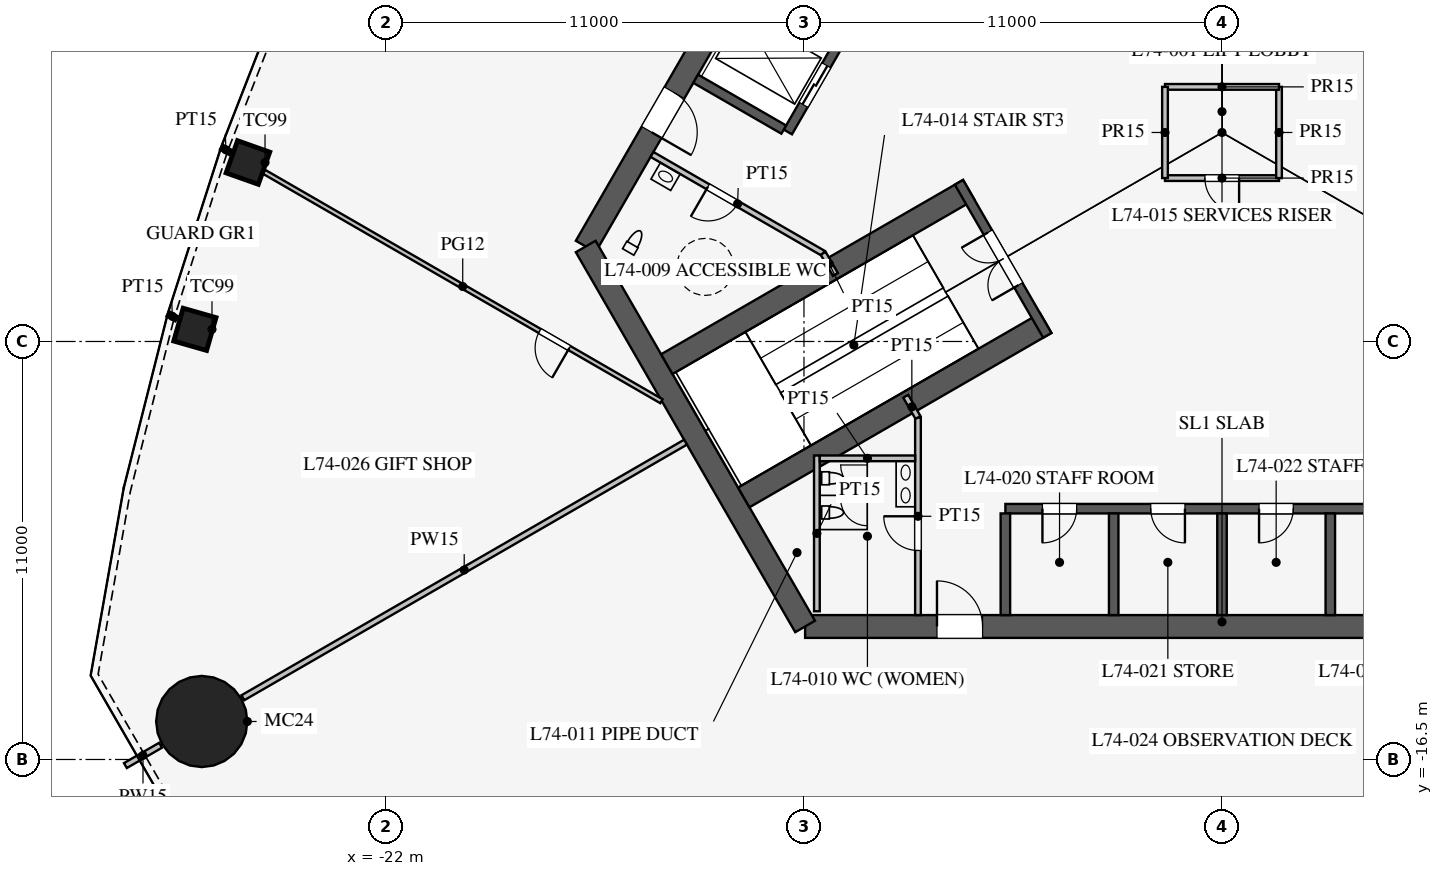
"""IFC4 building model, lengths in metres.
Left out: names, types, materials, properties, quantities, classifications, styles, units other than length and angle.
Written with IfcOpenShell. Run it as: python <this file> out.ifc"""

import sys

from ifc_helpers import new_model, si_unit, direction, frame, frame_2d, origin, origin_2d, place, context, subcontext, project, spatial, rectangle, circle, extrude, element, fill, save


model = new_model("IFC4")
c1 = context("Model", 3, precision=1e-05, world=origin(), true_north=direction((0.0, 1.0)))
c2 = subcontext(c1, "Body", "Model", "MODEL_VIEW")
j1 = project(units=[si_unit("LENGTHUNIT", "METRE"), si_unit("PLANEANGLEUNIT", "RADIAN")], contexts=[c1])
p1 = place(None, origin())
s1 = spatial("IfcSite", under=j1, at=p1, CompositionType="ELEMENT")
p2 = place(p1, origin())
s2 = spatial("IfcBuilding", under=s1, at=p2, CompositionType="ELEMENT")
p3 = place(p2, frame((0.0, 0.0, 322.5)))
s3 = spatial("IfcBuildingStorey", under=s2, at=p3, CompositionType="ELEMENT", Elevation=322.5)
for number, where, z_axis, x_axis in (
    (1, (-25.632, -0.79, 0.0), (0.0, 0.0, 1.0), (-0.334, -0.942, 0.0)),
    (2, (-27.027, -5.18, 0.0), (0.0, 0.0, 1.0), (-0.275, -0.961, 0.0)),
):
    element("IfcColumn", number, at=place(p3, frame(where, z_axis=z_axis, x_axis=x_axis)), inside=s3, PredefinedType="COLUMN", context=c2, shape_type="SweptSolid", body=[
        extrude(rectangle(XDim=0.9, YDim=0.9, at=origin_2d()), origin(), (0.0, 0.0, 1.0), 6.0),
    ])
p4 = place(p3, frame((-26.847, -15.5, 0.0), z_axis=(0.0, 0.0, 1.0), x_axis=(1.0, 0.0, 0.0)))
e3 = element("IfcColumn", 3, at=p4, inside=s3, PredefinedType="COLUMN", context=c2, shape_type="SweptSolid", body=[
    extrude(circle(Radius=1.2, at=origin_2d()), origin(), (0.0, 0.0, 1.0), 6.0),
])
p5 = place(p3, frame((-10.97, -13.0, 0.0), z_axis=(0.0, 0.0, 1.0), x_axis=(1.0, 0.0, 0.0)))
e4 = element("IfcWall", 4, at=p5, inside=s3, PredefinedType="SHEAR", context=c2, shape_type="SweptSolid", body=[
    extrude(rectangle(XDim=21.939, YDim=0.6, at=frame_2d((10.97, 0.0))), origin(), (0.0, 0.0, 1.0), 6.0),
])
p6 = place(p5, frame((17.27, 0.0, 0.0)))
e5 = element("IfcOpeningElement", 5, at=p6, cuts=e4, PredefinedType="OPENING", context=c2, shape_type="SweptSolid", body=[
    extrude(rectangle(XDim=1.2, YDim=2.1, at=frame_2d((0.6, 1.05))), frame((0.0, 0.31, 0.0), z_axis=(0.0, -1.0, 0.0), x_axis=(1.0, 0.0, 0.0)), (0.0, 0.0, 1.0), 0.62),
])
p7 = place(p5, frame((3.47, 0.0, 0.0)))
e6 = element("IfcOpeningElement", 6, at=p7, cuts=e4, PredefinedType="OPENING", context=c2, shape_type="SweptSolid", body=[
    extrude(rectangle(XDim=1.2, YDim=2.1, at=frame_2d((0.6, 1.05))), frame((0.0, 0.31, 0.0), z_axis=(0.0, -1.0, 0.0), x_axis=(1.0, 0.0, 0.0)), (0.0, 0.0, 1.0), 0.62),
])
p8 = place(p3, frame((-5.773, 16.0, 0.0), z_axis=(0.0, 0.0, 1.0), x_axis=(-0.500002442456, -0.866023993627, 0.0)))
e7 = element("IfcWall", 7, at=p8, inside=s3, PredefinedType="SHEAR", context=c2, shape_type="SweptSolid", body=[
    extrude(rectangle(XDim=21.939, YDim=0.6, at=frame_2d((10.97, 0.0))), origin(), (0.0, 0.0, 1.0), 6.0),
])
p9 = place(p8, frame((17.27, 0.0, 0.0)))
e8 = element("IfcOpeningElement", 8, at=p9, cuts=e7, PredefinedType="OPENING", context=c2, shape_type="SweptSolid", body=[
    extrude(rectangle(XDim=1.2, YDim=2.1, at=frame_2d((0.6, 1.05))), frame((0.0, 0.31, 0.0), z_axis=(0.0, -1.0, 0.0), x_axis=(1.0, 0.0, 0.0)), (0.0, 0.0, 1.0), 0.62),
])
p10 = place(p8, frame((3.47, 0.0, 0.0)))
e9 = element("IfcOpeningElement", 9, at=p10, cuts=e7, PredefinedType="OPENING", context=c2, shape_type="SweptSolid", body=[
    extrude(rectangle(XDim=1.2, YDim=2.1, at=frame_2d((0.6, 1.05))), frame((0.0, 0.31, 0.0), z_axis=(0.0, -1.0, 0.0), x_axis=(1.0, 0.0, 0.0)), (0.0, 0.0, 1.0), 0.62),
])
p11 = place(p3, frame((-16.743, -3.0, 0.0), z_axis=(0.0, 0.0, 1.0), x_axis=(0.499995765644, -0.866027848477, 0.0)))
e10 = element("IfcWall", 10, at=p11, inside=s3, PredefinedType="SHEAR", context=c2, shape_type="SweptSolid", body=[
    extrude(rectangle(XDim=11.547, YDim=0.6, at=frame_2d((5.773, 0.0))), origin(), (0.0, 0.0, 1.0), 6.0),
])
p12 = place(p3, frame((-5.7, -9.9, 0.0), z_axis=(0.0, 0.0, 1.0), x_axis=(1.0, 0.0, 0.0)))
e11 = element("IfcWall", 11, at=p12, inside=s3, PredefinedType="SHEAR", context=c2, shape_type="SweptSolid", body=[
    extrude(rectangle(XDim=11.4, YDim=0.25, at=frame_2d((5.7, 0.0))), origin(), (0.0, 0.0, 1.0), 6.0),
])
p13 = place(p12, frame((0.975, 0.0, 0.0)))
e12 = element("IfcOpeningElement", 12, at=p13, cuts=e11, PredefinedType="OPENING", context=c2, shape_type="SweptSolid", body=[
    extrude(rectangle(XDim=0.9, YDim=2.1, at=frame_2d((0.45, 1.05))), frame((0.0, 0.135, 0.0), z_axis=(0.0, -1.0, 0.0), x_axis=(1.0, 0.0, 0.0)), (0.0, 0.0, 1.0), 0.27),
])
p14 = place(p12, frame((3.825, 0.0, 0.0)))
e13 = element("IfcOpeningElement", 13, at=p14, cuts=e11, PredefinedType="OPENING", context=c2, shape_type="SweptSolid", body=[
    extrude(rectangle(XDim=0.9, YDim=2.1, at=frame_2d((0.45, 1.05))), frame((0.0, 0.135, 0.0), z_axis=(0.0, -1.0, 0.0), x_axis=(1.0, 0.0, 0.0)), (0.0, 0.0, 1.0), 0.27),
])
p15 = place(p12, frame((6.675, 0.0, 0.0)))
e14 = element("IfcOpeningElement", 14, at=p15, cuts=e11, PredefinedType="OPENING", context=c2, shape_type="SweptSolid", body=[
    extrude(rectangle(XDim=0.9, YDim=2.1, at=frame_2d((0.45, 1.05))), frame((0.0, 0.135, 0.0), z_axis=(0.0, -1.0, 0.0), x_axis=(1.0, 0.0, 0.0)), (0.0, 0.0, 1.0), 0.27),
])
p16 = place(p12, frame((9.525, 0.0, 0.0)))
e15 = element("IfcOpeningElement", 15, at=p16, cuts=e11, PredefinedType="OPENING", context=c2, shape_type="SweptSolid", body=[
    extrude(rectangle(XDim=0.9, YDim=2.1, at=frame_2d((0.45, 1.05))), frame((0.0, 0.135, 0.0), z_axis=(0.0, -1.0, 0.0), x_axis=(1.0, 0.0, 0.0)), (0.0, 0.0, 1.0), 0.27),
])
for number, where, z_axis, x_axis in (
    (16, (-5.7, -10.025, 0.0), (0.0, 0.0, 1.0), (0.0, -1.0, 0.0)),
    (17, (-2.85, -10.025, 0.0), (0.0, 0.0, 1.0), (0.0, -1.0, 0.0)),
    (18, (0.0, -10.025, 0.0), (0.0, 0.0, 1.0), (0.0, -1.0, 0.0)),
    (19, (2.85, -10.025, 0.0), (0.0, 0.0, 1.0), (0.0, -1.0, 0.0)),
):
    element("IfcWall", number, at=place(p3, frame(where, z_axis=z_axis, x_axis=x_axis)), inside=s3, PredefinedType="SHEAR", context=c2, shape_type="SweptSolid", body=[
        extrude(rectangle(XDim=2.675, YDim=0.25, at=frame_2d((1.337, 0.0))), origin(), (0.0, 0.0, 1.0), 6.0),
    ])
p17 = place(p3, frame((-5.724, 9.886, 0.0), z_axis=(0.0, 0.0, 1.0), x_axis=(-0.500001763848, -0.866024385424, 0.0)))
e20 = element("IfcWall", 20, at=p17, inside=s3, PredefinedType="SHEAR", context=c2, shape_type="SweptSolid", body=[
    extrude(rectangle(XDim=11.4, YDim=0.25, at=frame_2d((5.7, 0.0))), origin(), (0.0, 0.0, 1.0), 6.0),
])
p18 = place(p17, frame((0.875, 0.0, 0.0)))
e21 = element("IfcOpeningElement", 21, at=p18, cuts=e20, PredefinedType="OPENING", context=c2, shape_type="SweptSolid", body=[
    extrude(rectangle(XDim=1.1, YDim=2.2, at=frame_2d((0.55, 1.1))), frame((0.0, 0.135, 0.0), z_axis=(0.0, -1.0, 0.0), x_axis=(1.0, 0.0, 0.0)), (0.0, 0.0, 1.0), 0.27),
])
p19 = place(p17, frame((3.725, 0.0, 0.0)))
e22 = element("IfcOpeningElement", 22, at=p19, cuts=e20, PredefinedType="OPENING", context=c2, shape_type="SweptSolid", body=[
    extrude(rectangle(XDim=1.1, YDim=2.2, at=frame_2d((0.55, 1.1))), frame((0.0, 0.135, 0.0), z_axis=(0.0, -1.0, 0.0), x_axis=(1.0, 0.0, 0.0)), (0.0, 0.0, 1.0), 0.27),
])
p20 = place(p17, frame((6.525, 0.0, 0.0)))
e23 = element("IfcOpeningElement", 23, at=p20, cuts=e20, PredefinedType="OPENING", context=c2, shape_type="SweptSolid", body=[
    extrude(rectangle(XDim=1.2, YDim=2.2, at=frame_2d((0.6, 1.1))), frame((0.0, 0.135, 0.0), z_axis=(0.0, -1.0, 0.0), x_axis=(1.0, 0.0, 0.0)), (0.0, 0.0, 1.0), 0.27),
])
p21 = place(p17, frame((9.375, 0.0, 0.0)))
e24 = element("IfcOpeningElement", 24, at=p21, cuts=e20, PredefinedType="OPENING", context=c2, shape_type="SweptSolid", body=[
    extrude(rectangle(XDim=1.2, YDim=2.2, at=frame_2d((0.6, 1.1))), frame((0.0, 0.135, 0.0), z_axis=(0.0, -1.0, 0.0), x_axis=(1.0, 0.0, 0.0)), (0.0, 0.0, 1.0), 0.27),
])
p22 = place(p3, frame((-11.532, 0.076, 0.0), z_axis=(0.0, 0.0, 1.0), x_axis=(-0.86604424267, 0.499967368674, 0.0)))
e25 = element("IfcWall", 25, at=p22, inside=s3, PredefinedType="SHEAR", context=c2, shape_type="SweptSolid", body=[
    extrude(rectangle(XDim=2.675, YDim=0.25, at=frame_2d((1.337, 0.0))), origin(), (0.0, 0.0, 1.0), 6.0),
])
p23 = place(p3, frame((-6.663, -1.509, 0.0), z_axis=(0.0, 0.0, 1.0), x_axis=(-0.86603049496, -0.499991181721, 0.0)))
e26 = element("IfcWall", 26, at=p23, inside=s3, PredefinedType="SHEAR", context=c2, shape_type="SweptSolid", body=[
    extrude(rectangle(XDim=9.175, YDim=0.6, at=frame_2d((4.587, 0.0))), origin(), (0.0, 0.0, 1.0), 6.0),
])
p24 = place(p3, frame((-4.638, -5.016, 0.0), z_axis=(0.0, 0.0, 1.0), x_axis=(-0.866012320003, -0.50002266109, 0.0)))
e27 = element("IfcWall", 27, at=p24, inside=s3, PredefinedType="SHEAR", context=c2, shape_type="SweptSolid", body=[
    extrude(rectangle(XDim=9.175, YDim=0.6, at=frame_2d((4.587, 0.0))), origin(), (0.0, 0.0, 1.0), 6.0),
])
p25 = place(p3, frame((-6.922, -1.312, 0.0), z_axis=(0.0, 0.0, 1.0), x_axis=(0.499984536904, -0.866034331223, 0.0)))
e28 = element("IfcWall", 28, at=p25, inside=s3, PredefinedType="SHEAR", context=c2, shape_type="SweptSolid", body=[
    extrude(rectangle(XDim=4.65, YDim=0.25, at=frame_2d((2.325, 0.0))), origin(), (0.0, 0.0, 1.0), 6.0),
])
p26 = place(p25, frame((1.525, 0.0, 0.0)))
e29 = element("IfcOpeningElement", 29, at=p26, cuts=e28, PredefinedType="OPENING", context=c2, shape_type="SweptSolid", body=[
    extrude(rectangle(XDim=1.6, YDim=2.1, at=frame_2d((0.8, 1.05))), frame((0.0, 0.135, 0.0), z_axis=(0.0, -1.0, 0.0), x_axis=(1.0, 0.0, 0.0)), (0.0, 0.0, 1.0), 0.27),
])
p27 = place(p3, frame((-8.0, -7.5, 0.0), z_axis=(0.0, 0.0, 1.0), x_axis=(0.0, -1.0, 0.0)))
e30 = element("IfcWall", 30, at=p27, inside=s3, PredefinedType="PARTITIONING", context=c2, shape_type="SweptSolid", body=[
    extrude(rectangle(XDim=5.2, YDim=0.15, at=frame_2d((2.6, 0.0))), origin(), (0.0, 0.0, 1.0), 5.75),
])
p28 = place(p27, frame((2.6, 0.0, 0.0)))
e31 = element("IfcOpeningElement", 31, at=p28, cuts=e30, PredefinedType="OPENING", context=c2, shape_type="SweptSolid", body=[
    extrude(rectangle(XDim=0.9, YDim=2.1, at=frame_2d((0.45, 1.05))), frame((0.0, 0.085, 0.0), z_axis=(0.0, -1.0, 0.0), x_axis=(1.0, 0.0, 0.0)), (0.0, 0.0, 1.0), 0.17),
])
p29 = place(p3, frame((-10.495, -3.178, 0.0), z_axis=(0.0, 0.0, 1.0), x_axis=(-0.866021400173, 0.500006934395, 0.0)))
e32 = element("IfcWall", 32, at=p29, inside=s3, PredefinedType="PARTITIONING", context=c2, shape_type="SweptSolid", body=[
    extrude(rectangle(XDim=5.2, YDim=0.15, at=frame_2d((2.6, 0.0))), origin(), (0.0, 0.0, 1.0), 5.75),
])
p30 = place(p29, frame((2.6, 0.0, 0.0)))
e33 = element("IfcOpeningElement", 33, at=p30, cuts=e32, PredefinedType="OPENING", context=c2, shape_type="SweptSolid", body=[
    extrude(rectangle(XDim=0.9, YDim=2.1, at=frame_2d((0.45, 1.05))), frame((0.0, 0.085, 0.0), z_axis=(0.0, -1.0, 0.0), x_axis=(1.0, 0.0, 0.0)), (0.0, 0.0, 1.0), 0.17),
])
for number, where, z_axis, x_axis in (
    (34, (-10.495, -3.178, 0.0), (0.0, 0.0, 1.0), (0.5, -0.866, 0.0)),
    (35, (-8.0, -7.5, 0.0), (0.0, 0.0, 1.0), (-0.5, 0.866, 0.0)),
):
    element("IfcWall", number, at=place(p3, frame(where, z_axis=z_axis, x_axis=x_axis)), inside=s3, PredefinedType="PARTITIONING", context=c2, shape_type="SweptSolid", body=[
        extrude(rectangle(XDim=0.645, YDim=0.15, at=frame_2d((0.323, 0.0))), origin(), (0.0, 0.0, 1.0), 5.75),
    ])
p31 = place(p3, frame((-10.66, -8.5, 0.0), z_axis=(0.0, 0.0, 1.0), x_axis=(0.0, -1.0, 0.0)))
e36 = element("IfcWall", 36, at=p31, inside=s3, PredefinedType="PARTITIONING", context=c2, shape_type="SweptSolid", body=[
    extrude(rectangle(XDim=4.1, YDim=0.15, at=frame_2d((2.05, 0.0))), origin(), (0.0, 0.0, 1.0), 5.75),
])
p32 = place(p3, frame((-8.075, -8.575, 0.0), z_axis=(0.0, 0.0, 1.0), x_axis=(-1.0, 0.0, 0.0)))
e37 = element("IfcWall", 37, at=p32, inside=s3, PredefinedType="PARTITIONING", context=c2, shape_type="SweptSolid", body=[
    extrude(rectangle(XDim=2.51, YDim=0.15, at=frame_2d((1.255, 0.0))), origin(), (0.0, 0.0, 1.0), 5.75),
])
p33 = place(p3, frame((-1.5, -1.2, 0.0), z_axis=(0.0, 0.0, 1.0), x_axis=(1.0, 0.0, 0.0)))
e38 = element("IfcWall", 38, at=p33, inside=s3, PredefinedType="PARTITIONING", context=c2, shape_type="SweptSolid", body=[
    extrude(rectangle(XDim=3.0, YDim=0.15, at=frame_2d((1.5, 0.0))), origin(), (0.0, 0.0, 1.0), 5.75),
])
p34 = place(p33, frame((1.05, 0.0, 0.0)))
e39 = element("IfcOpeningElement", 39, at=p34, cuts=e38, PredefinedType="OPENING", context=c2, shape_type="SweptSolid", body=[
    extrude(rectangle(XDim=0.9, YDim=2.1, at=frame_2d((0.45, 1.05))), frame((0.0, 0.085, 0.0), z_axis=(0.0, -1.0, 0.0), x_axis=(1.0, 0.0, 0.0)), (0.0, 0.0, 1.0), 0.17),
])
p35 = place(p3, frame((1.5, -1.2, 0.0), z_axis=(0.0, 0.0, 1.0), x_axis=(0.0, 1.0, 0.0)))
e40 = element("IfcWall", 40, at=p35, inside=s3, PredefinedType="PARTITIONING", context=c2, shape_type="SweptSolid", body=[
    extrude(rectangle(XDim=2.4, YDim=0.15, at=frame_2d((1.2, 0.0))), origin(), (0.0, 0.0, 1.0), 5.75),
])
p36 = place(p3, frame((1.5, 1.2, 0.0), z_axis=(0.0, 0.0, 1.0), x_axis=(-1.0, 0.0, 0.0)))
e41 = element("IfcWall", 41, at=p36, inside=s3, PredefinedType="PARTITIONING", context=c2, shape_type="SweptSolid", body=[
    extrude(rectangle(XDim=3.0, YDim=0.15, at=frame_2d((1.5, 0.0))), origin(), (0.0, 0.0, 1.0), 5.75),
])
p37 = place(p3, frame((-1.5, 1.2, 0.0), z_axis=(0.0, 0.0, 1.0), x_axis=(0.0, -1.0, 0.0)))
e42 = element("IfcWall", 42, at=p37, inside=s3, PredefinedType="PARTITIONING", context=c2, shape_type="SweptSolid", body=[
    extrude(rectangle(XDim=2.4, YDim=0.15, at=frame_2d((1.2, 0.0))), origin(), (0.0, 0.0, 1.0), 5.75),
])
p38 = place(p3, frame((-14.116, -8.15, 0.0), z_axis=(0.0, 0.0, 1.0), x_axis=(-0.866020541135, -0.500008422262, 0.0)))
e43 = element("IfcWall", 43, at=p38, inside=s3, PredefinedType="PARTITIONING", context=c2, shape_type="SweptSolid", body=[
    extrude(rectangle(XDim=13.45, YDim=0.15, at=frame_2d((6.725, 0.0))), origin(), (0.0, 0.0, 1.0), 3.75),
])
p39 = place(p3, frame((-27.929, -16.125, 0.0), z_axis=(0.0, 0.0, 1.0), x_axis=(-0.866086810508, -0.499893625349, 0.0)))
e44 = element("IfcWall", 44, at=p39, inside=s3, PredefinedType="PARTITIONING", context=c2, shape_type="SweptSolid", body=[
    extrude(rectangle(XDim=1.07, YDim=0.15, at=frame_2d((0.535, 0.0))), origin(), (0.0, 0.0, 1.0), 3.75),
])
p40 = place(p3, frame((-26.089, -0.526, 0.0), z_axis=(0.0, 0.0, 1.0), x_axis=(-0.865982457891, 0.500074377092, 0.0)))
e45 = element("IfcWall", 45, at=p40, inside=s3, PredefinedType="PARTITIONING", context=c2, shape_type="SweptSolid", body=[
    extrude(rectangle(XDim=0.28, YDim=0.15, at=frame_2d((0.14, 0.0))), origin(), (0.0, 0.0, 1.0), 4.5),
])
p41 = place(p3, frame((-27.504, -4.906, 0.0), z_axis=(0.0, 0.0, 1.0), x_axis=(-0.865612200464, 0.500715007172, 0.0)))
e46 = element("IfcWall", 46, at=p41, inside=s3, PredefinedType="PARTITIONING", context=c2, shape_type="SweptSolid", body=[
    extrude(rectangle(XDim=0.27, YDim=0.15, at=frame_2d((0.135, 0.0))), origin(), (0.0, 0.0, 1.0), 4.5),
])
p42 = place(p3, frame((-14.75, -7.073, 0.0), z_axis=(0.0, 0.0, 1.0), x_axis=(-0.866024005325, 0.500002422196, 0.0)))
e47 = element("IfcWall", 47, at=p42, inside=s3, PredefinedType="PARTITIONING", context=c2, shape_type="SweptSolid", body=[
    extrude(rectangle(XDim=12.078, YDim=0.12, at=frame_2d((6.039, 0.0))), origin(), (0.0, 0.0, 1.0), 4.5),
])
p43 = place(p42, frame((2.8, 0.0, 0.0)))
e48 = element("IfcOpeningElement", 48, at=p43, cuts=e47, PredefinedType="OPENING", context=c2, shape_type="SweptSolid", body=[
    extrude(rectangle(XDim=0.9, YDim=2.1, at=frame_2d((0.45, 1.05))), frame((0.0, 0.07, 0.0), z_axis=(0.0, -1.0, 0.0), x_axis=(1.0, 0.0, 0.0)), (0.0, 0.0, 1.0), 0.14),
])
p44 = place(p28, frame((0.9, 0.0, 0.0), z_axis=(0.0, 0.0, 1.0), x_axis=(-1.0, 0.0, 0.0)))
e49 = element("IfcDoor", 49, at=p44, inside=s3, OperationType="SINGLE_SWING_RIGHT", PredefinedType="DOOR", context=c2, shape_type="SweptSolid", body=[
    extrude(rectangle(XDim=0.9, YDim=2.1, at=frame_2d((0.45, 1.05))), frame((0.0, 0.025, 0.0), z_axis=(0.0, -1.0, 0.0), x_axis=(1.0, 0.0, 0.0)), (0.0, 0.0, 1.0), 0.05),
])
fill(e31, e49)
p45 = place(p30, origin())
e50 = element("IfcDoor", 50, at=p45, inside=s3, OperationType="SINGLE_SWING_RIGHT", PredefinedType="DOOR", context=c2, shape_type="SweptSolid", body=[
    extrude(rectangle(XDim=0.9, YDim=2.1, at=frame_2d((0.45, 1.05))), frame((0.0, 0.025, 0.0), z_axis=(0.0, -1.0, 0.0), x_axis=(1.0, 0.0, 0.0)), (0.0, 0.0, 1.0), 0.05),
])
fill(e33, e50)
p46 = place(p34, frame((0.9, 0.0, 0.0), z_axis=(0.0, 0.0, 1.0), x_axis=(-1.0, 0.0, 0.0)))
e51 = element("IfcDoor", 51, at=p46, inside=s3, OperationType="SINGLE_SWING_LEFT", PredefinedType="DOOR", context=c2, shape_type="SweptSolid", body=[
    extrude(rectangle(XDim=0.9, YDim=2.1, at=frame_2d((0.45, 1.05))), frame((0.0, 0.025, 0.0), z_axis=(0.0, -1.0, 0.0), x_axis=(1.0, 0.0, 0.0)), (0.0, 0.0, 1.0), 0.05),
])
fill(e39, e51)
p47 = place(p26, frame((1.6, 0.0, 0.0), z_axis=(0.0, 0.0, 1.0), x_axis=(-1.0, 0.0, 0.0)))
e52 = element("IfcDoor", 52, at=p47, inside=s3, OperationType="DOUBLE_DOOR_SINGLE_SWING", PredefinedType="DOOR", context=c2, shape_type="SweptSolid", body=[
    extrude(rectangle(XDim=1.6, YDim=2.1, at=frame_2d((0.8, 1.05))), frame((0.0, 0.025, 0.0), z_axis=(0.0, -1.0, 0.0), x_axis=(1.0, 0.0, 0.0)), (0.0, 0.0, 1.0), 0.05),
])
fill(e29, e52)
p48 = place(p7, origin())
e53 = element("IfcDoor", 53, at=p48, inside=s3, OperationType="SINGLE_SWING_LEFT", PredefinedType="DOOR", context=c2, shape_type="SweptSolid", body=[
    extrude(rectangle(XDim=1.2, YDim=2.1, at=frame_2d((0.6, 1.05))), frame((0.0, 0.025, 0.0), z_axis=(0.0, -1.0, 0.0), x_axis=(1.0, 0.0, 0.0)), (0.0, 0.0, 1.0), 0.05),
])
fill(e6, e53)
p49 = place(p9, origin())
e54 = element("IfcDoor", 54, at=p49, inside=s3, OperationType="SINGLE_SWING_RIGHT", PredefinedType="DOOR", context=c2, shape_type="SweptSolid", body=[
    extrude(rectangle(XDim=1.2, YDim=2.1, at=frame_2d((0.6, 1.05))), frame((0.0, 0.025, 0.0), z_axis=(0.0, -1.0, 0.0), x_axis=(1.0, 0.0, 0.0)), (0.0, 0.0, 1.0), 0.05),
])
fill(e8, e54)
p50 = place(p13, frame((0.9, 0.0, 0.0), z_axis=(0.0, 0.0, 1.0), x_axis=(-1.0, 0.0, 0.0)))
e55 = element("IfcDoor", 55, at=p50, inside=s3, OperationType="SINGLE_SWING_RIGHT", PredefinedType="DOOR", context=c2, shape_type="SweptSolid", body=[
    extrude(rectangle(XDim=0.9, YDim=2.1, at=frame_2d((0.45, 1.05))), frame((0.0, 0.025, 0.0), z_axis=(0.0, -1.0, 0.0), x_axis=(1.0, 0.0, 0.0)), (0.0, 0.0, 1.0), 0.05),
])
fill(e12, e55)
p51 = place(p14, frame((0.9, 0.0, 0.0), z_axis=(0.0, 0.0, 1.0), x_axis=(-1.0, 0.0, 0.0)))
e56 = element("IfcDoor", 56, at=p51, inside=s3, OperationType="SINGLE_SWING_LEFT", PredefinedType="DOOR", context=c2, shape_type="SweptSolid", body=[
    extrude(rectangle(XDim=0.9, YDim=2.1, at=frame_2d((0.45, 1.05))), frame((0.0, 0.025, 0.0), z_axis=(0.0, -1.0, 0.0), x_axis=(1.0, 0.0, 0.0)), (0.0, 0.0, 1.0), 0.05),
])
fill(e13, e56)
p52 = place(p15, frame((0.9, 0.0, 0.0), z_axis=(0.0, 0.0, 1.0), x_axis=(-1.0, 0.0, 0.0)))
e57 = element("IfcDoor", 57, at=p52, inside=s3, OperationType="SINGLE_SWING_RIGHT", PredefinedType="DOOR", context=c2, shape_type="SweptSolid", body=[
    extrude(rectangle(XDim=0.9, YDim=2.1, at=frame_2d((0.45, 1.05))), frame((0.0, 0.025, 0.0), z_axis=(0.0, -1.0, 0.0), x_axis=(1.0, 0.0, 0.0)), (0.0, 0.0, 1.0), 0.05),
])
fill(e14, e57)
p53 = place(p43, origin())
e58 = element("IfcDoor", 58, at=p53, inside=s3, OperationType="SINGLE_SWING_LEFT", PredefinedType="DOOR", context=c2, shape_type="SweptSolid", body=[
    extrude(rectangle(XDim=0.9, YDim=2.1, at=frame_2d((0.45, 1.05))), frame((0.0, 0.025, 0.0), z_axis=(0.0, -1.0, 0.0), x_axis=(1.0, 0.0, 0.0)), (0.0, 0.0, 1.0), 0.05),
])
fill(e48, e58)
p54 = place(p21, origin())
e59 = element("IfcDoor", 59, at=p54, inside=s3, OperationType="DOUBLE_DOOR_SLIDING", PredefinedType="DOOR", context=c2, shape_type="SweptSolid", body=[
    extrude(rectangle(XDim=1.2, YDim=2.2, at=frame_2d((0.6, 1.1))), frame((0.0, 0.025, 0.0), z_axis=(0.0, -1.0, 0.0), x_axis=(1.0, 0.0, 0.0)), (0.0, 0.0, 1.0), 0.05),
])
fill(e24, e59)
save(model, sys.argv[1])
